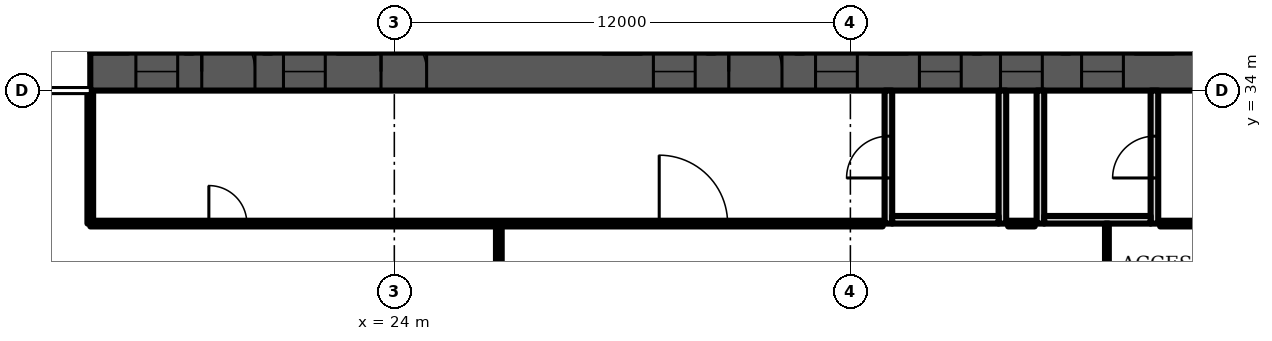
"""IFC4 building model, lengths in metres.
Left out: names, types, materials, properties, quantities, classifications, styles, units other than length and angle.
Written with IfcOpenShell. Run it as: python <this file> out.ifc"""

import sys

from ifc_helpers import new_model, si_unit, direction, frame, frame_2d, origin, place, context, subcontext, project, spatial, rectangle, extrude, element, fill, save


model = new_model("IFC4")
c1 = context("Model", 3, precision=1e-05, world=origin(), true_north=direction((0.0, 1.0)))
c2 = subcontext(c1, "Body", "Model", "MODEL_VIEW")
j1 = project(units=[si_unit("LENGTHUNIT", "METRE"), si_unit("PLANEANGLEUNIT", "RADIAN")], contexts=[c1])
p1 = place(None, origin())
s1 = spatial("IfcSite", under=j1, at=p1, CompositionType="ELEMENT")
p2 = place(p1, origin())
s2 = spatial("IfcBuilding", under=s1, at=p2, CompositionType="ELEMENT")
p3 = place(p2, frame((0.0, 0.0, 147.1)))
s3 = spatial("IfcBuildingStorey", under=s2, at=p3, CompositionType="ELEMENT", Elevation=147.1)
p4 = place(p3, frame((16.0, 34.5, 0.0), z_axis=(0.0, 0.0, 1.0), x_axis=(1.0, 0.0, 0.0)))
e1 = element("IfcWall", 1, at=p4, inside=s3, PredefinedType="SHEAR", context=c2, shape_type="SweptSolid", body=[
    extrude(rectangle(XDim=49.0, YDim=1.0, at=frame_2d((24.5, 0.0))), origin(), (0.0, 0.0, 1.0), 4.8),
])
p5 = place(p4, frame((1.2, 0.0, 0.0)))
e2 = element("IfcOpeningElement", 2, at=p5, cuts=e1, PredefinedType="OPENING", context=c2, shape_type="SweptSolid", body=[
    extrude(rectangle(XDim=1.1, YDim=2.1, at=frame_2d((0.55, 1.05))), frame((0.0, 0.51, 0.0), z_axis=(0.0, -1.0, 0.0), x_axis=(1.0, 0.0, 0.0)), (0.0, 0.0, 1.0), 1.02),
])
p6 = place(p4, frame((5.083, 0.0, 0.0)))
e3 = element("IfcOpeningElement", 3, at=p6, cuts=e1, PredefinedType="OPENING", context=c2, shape_type="SweptSolid", body=[
    extrude(rectangle(XDim=1.1, YDim=2.1, at=frame_2d((0.55, 1.05))), frame((0.0, 0.51, 0.0), z_axis=(0.0, -1.0, 0.0), x_axis=(1.0, 0.0, 0.0)), (0.0, 0.0, 1.0), 1.02),
])
p7 = place(p4, frame((2.933, 0.0, 0.0)))
e4 = element("IfcOpeningElement", 4, at=p7, cuts=e1, PredefinedType="OPENING", context=c2, shape_type="SweptSolid", body=[
    extrude(rectangle(XDim=1.4, YDim=2.1, at=frame_2d((0.7, 1.05))), frame((0.0, 0.51, 0.0), z_axis=(0.0, -1.0, 0.0), x_axis=(1.0, 0.0, 0.0)), (0.0, 0.0, 1.0), 1.02),
])
p8 = place(p4, frame((7.65, 0.0, 0.0)))
e5 = element("IfcOpeningElement", 5, at=p8, cuts=e1, PredefinedType="OPENING", context=c2, shape_type="SweptSolid", body=[
    extrude(rectangle(XDim=1.2, YDim=2.1, at=frame_2d((0.6, 1.05))), frame((0.0, 0.51, 0.0), z_axis=(0.0, -1.0, 0.0), x_axis=(1.0, 0.0, 0.0)), (0.0, 0.0, 1.0), 1.02),
])
p9 = place(p4, frame((14.817, 0.0, 0.0)))
e6 = element("IfcOpeningElement", 6, at=p9, cuts=e1, PredefinedType="OPENING", context=c2, shape_type="SweptSolid", body=[
    extrude(rectangle(XDim=1.1, YDim=2.1, at=frame_2d((0.55, 1.05))), frame((0.0, 0.51, 0.0), z_axis=(0.0, -1.0, 0.0), x_axis=(1.0, 0.0, 0.0)), (0.0, 0.0, 1.0), 1.02),
])
p10 = place(p4, frame((19.083, 0.0, 0.0)))
e7 = element("IfcOpeningElement", 7, at=p10, cuts=e1, PredefinedType="OPENING", context=c2, shape_type="SweptSolid", body=[
    extrude(rectangle(XDim=1.1, YDim=2.1, at=frame_2d((0.55, 1.05))), frame((0.0, 0.51, 0.0), z_axis=(0.0, -1.0, 0.0), x_axis=(1.0, 0.0, 0.0)), (0.0, 0.0, 1.0), 1.02),
])
p11 = place(p4, frame((16.8, 0.0, 0.0)))
e8 = element("IfcOpeningElement", 8, at=p11, cuts=e1, PredefinedType="OPENING", context=c2, shape_type="SweptSolid", body=[
    extrude(rectangle(XDim=1.4, YDim=2.1, at=frame_2d((0.7, 1.05))), frame((0.0, 0.51, 0.0), z_axis=(0.0, -1.0, 0.0), x_axis=(1.0, 0.0, 0.0)), (0.0, 0.0, 1.0), 1.02),
])
p12 = place(p4, frame((21.817, 0.0, 0.0)))
e9 = element("IfcOpeningElement", 9, at=p12, cuts=e1, PredefinedType="OPENING", context=c2, shape_type="SweptSolid", body=[
    extrude(rectangle(XDim=1.1, YDim=2.1, at=frame_2d((0.55, 1.05))), frame((0.0, 0.51, 0.0), z_axis=(0.0, -1.0, 0.0), x_axis=(1.0, 0.0, 0.0)), (0.0, 0.0, 1.0), 1.02),
])
p13 = place(p4, frame((23.95, 0.0, 0.0)))
e10 = element("IfcOpeningElement", 10, at=p13, cuts=e1, PredefinedType="OPENING", context=c2, shape_type="SweptSolid", body=[
    extrude(rectangle(XDim=1.1, YDim=2.1, at=frame_2d((0.55, 1.05))), frame((0.0, 0.51, 0.0), z_axis=(0.0, -1.0, 0.0), x_axis=(1.0, 0.0, 0.0)), (0.0, 0.0, 1.0), 1.02),
])
p14 = place(p4, frame((26.083, 0.0, 0.0)))
e11 = element("IfcOpeningElement", 11, at=p14, cuts=e1, PredefinedType="OPENING", context=c2, shape_type="SweptSolid", body=[
    extrude(rectangle(XDim=1.1, YDim=2.1, at=frame_2d((0.55, 1.05))), frame((0.0, 0.51, 0.0), z_axis=(0.0, -1.0, 0.0), x_axis=(1.0, 0.0, 0.0)), (0.0, 0.0, 1.0), 1.02),
])
p15 = place(p4, frame((33.15, 0.0, 0.0)))
e12 = element("IfcOpeningElement", 12, at=p15, cuts=e1, PredefinedType="OPENING", context=c2, shape_type="SweptSolid", body=[
    extrude(rectangle(XDim=1.2, YDim=2.1, at=frame_2d((0.6, 1.05))), frame((0.0, 0.51, 0.0), z_axis=(0.0, -1.0, 0.0), x_axis=(1.0, 0.0, 0.0)), (0.0, 0.0, 1.0), 1.02),
])
p16 = place(p4, frame((35.817, 0.0, 0.0)))
e13 = element("IfcOpeningElement", 13, at=p16, cuts=e1, PredefinedType="OPENING", context=c2, shape_type="SweptSolid", body=[
    extrude(rectangle(XDim=1.1, YDim=2.1, at=frame_2d((0.55, 1.05))), frame((0.0, 0.51, 0.0), z_axis=(0.0, -1.0, 0.0), x_axis=(1.0, 0.0, 0.0)), (0.0, 0.0, 1.0), 1.02),
])
p17 = place(p4, frame((40.083, 0.0, 0.0)))
e14 = element("IfcOpeningElement", 14, at=p17, cuts=e1, PredefinedType="OPENING", context=c2, shape_type="SweptSolid", body=[
    extrude(rectangle(XDim=1.1, YDim=2.1, at=frame_2d((0.55, 1.05))), frame((0.0, 0.51, 0.0), z_axis=(0.0, -1.0, 0.0), x_axis=(1.0, 0.0, 0.0)), (0.0, 0.0, 1.0), 1.02),
])
p18 = place(p4, frame((37.8, 0.0, 0.0)))
e15 = element("IfcOpeningElement", 15, at=p18, cuts=e1, PredefinedType="OPENING", context=c2, shape_type="SweptSolid", body=[
    extrude(rectangle(XDim=1.4, YDim=2.1, at=frame_2d((0.7, 1.05))), frame((0.0, 0.51, 0.0), z_axis=(0.0, -1.0, 0.0), x_axis=(1.0, 0.0, 0.0)), (0.0, 0.0, 1.0), 1.02),
])
p19 = place(p4, frame((42.817, 0.0, 0.0)))
e16 = element("IfcOpeningElement", 16, at=p19, cuts=e1, PredefinedType="OPENING", context=c2, shape_type="SweptSolid", body=[
    extrude(rectangle(XDim=1.1, YDim=2.1, at=frame_2d((0.55, 1.05))), frame((0.0, 0.51, 0.0), z_axis=(0.0, -1.0, 0.0), x_axis=(1.0, 0.0, 0.0)), (0.0, 0.0, 1.0), 1.02),
])
p20 = place(p4, frame((46.7, 0.0, 0.0)))
e17 = element("IfcOpeningElement", 17, at=p20, cuts=e1, PredefinedType="OPENING", context=c2, shape_type="SweptSolid", body=[
    extrude(rectangle(XDim=1.1, YDim=2.1, at=frame_2d((0.55, 1.05))), frame((0.0, 0.51, 0.0), z_axis=(0.0, -1.0, 0.0), x_axis=(1.0, 0.0, 0.0)), (0.0, 0.0, 1.0), 1.02),
])
p21 = place(p4, frame((44.667, 0.0, 0.0)))
e18 = element("IfcOpeningElement", 18, at=p21, cuts=e1, PredefinedType="OPENING", context=c2, shape_type="SweptSolid", body=[
    extrude(rectangle(XDim=1.4, YDim=2.1, at=frame_2d((0.7, 1.05))), frame((0.0, 0.51, 0.0), z_axis=(0.0, -1.0, 0.0), x_axis=(1.0, 0.0, 0.0)), (0.0, 0.0, 1.0), 1.02),
])
p22 = place(p3, frame((37.0, 30.5, 0.0), z_axis=(0.0, 0.0, 1.0), x_axis=(0.0, 1.0, 0.0)))
e19 = element("IfcWall", 19, at=p22, inside=s3, PredefinedType="PARTITIONING", context=c2, shape_type="SweptSolid", body=[
    extrude(rectangle(XDim=3.5, YDim=0.2, at=frame_2d((1.75, 0.0))), origin(), (0.0, 0.0, 1.0), 4.4),
])
p23 = place(p22, frame((1.2, 0.0, 0.0)))
e20 = element("IfcOpeningElement", 20, at=p23, cuts=e19, PredefinedType="OPENING", context=c2, shape_type="SweptSolid", body=[
    extrude(rectangle(XDim=1.1, YDim=2.1, at=frame_2d((0.55, 1.05))), frame((0.0, 0.11, 0.0), z_axis=(0.0, -1.0, 0.0), x_axis=(1.0, 0.0, 0.0)), (0.0, 0.0, 1.0), 0.22),
])
p24 = place(p3, frame((40.0, 30.5, 0.0), z_axis=(0.0, 0.0, 1.0), x_axis=(0.0, 1.0, 0.0)))
e21 = element("IfcWall", 21, at=p24, inside=s3, PredefinedType="PARTITIONING", context=c2, shape_type="SweptSolid", body=[
    extrude(rectangle(XDim=3.5, YDim=0.2, at=frame_2d((1.75, 0.0))), origin(), (0.0, 0.0, 1.0), 4.4),
])
p25 = place(p3, frame((37.1, 30.6, 0.0), z_axis=(0.0, 0.0, 1.0), x_axis=(1.0, 0.0, 0.0)))
e22 = element("IfcWall", 22, at=p25, inside=s3, PredefinedType="PARTITIONING", context=c2, shape_type="SweptSolid", body=[
    extrude(rectangle(XDim=2.8, YDim=0.2, at=frame_2d((1.4, 0.0))), origin(), (0.0, 0.0, 1.0), 4.4),
])
p26 = place(p3, frame((41.0, 30.5, 0.0), z_axis=(0.0, 0.0, 1.0), x_axis=(0.0, 1.0, 0.0)))
e23 = element("IfcWall", 23, at=p26, inside=s3, PredefinedType="PARTITIONING", context=c2, shape_type="SweptSolid", body=[
    extrude(rectangle(XDim=3.5, YDim=0.2, at=frame_2d((1.75, 0.0))), origin(), (0.0, 0.0, 1.0), 4.4),
])
p27 = place(p3, frame((44.0, 30.5, 0.0), z_axis=(0.0, 0.0, 1.0), x_axis=(0.0, 1.0, 0.0)))
e24 = element("IfcWall", 24, at=p27, inside=s3, PredefinedType="PARTITIONING", context=c2, shape_type="SweptSolid", body=[
    extrude(rectangle(XDim=3.5, YDim=0.2, at=frame_2d((1.75, 0.0))), origin(), (0.0, 0.0, 1.0), 4.4),
])
p28 = place(p27, frame((1.2, 0.0, 0.0)))
e25 = element("IfcOpeningElement", 25, at=p28, cuts=e24, PredefinedType="OPENING", context=c2, shape_type="SweptSolid", body=[
    extrude(rectangle(XDim=1.1, YDim=2.1, at=frame_2d((0.55, 1.05))), frame((0.0, 0.11, 0.0), z_axis=(0.0, -1.0, 0.0), x_axis=(1.0, 0.0, 0.0)), (0.0, 0.0, 1.0), 0.22),
])
p29 = place(p3, frame((41.1, 30.6, 0.0), z_axis=(0.0, 0.0, 1.0), x_axis=(1.0, 0.0, 0.0)))
e26 = element("IfcWall", 26, at=p29, inside=s3, PredefinedType="PARTITIONING", context=c2, shape_type="SweptSolid", body=[
    extrude(rectangle(XDim=2.8, YDim=0.2, at=frame_2d((1.4, 0.0))), origin(), (0.0, 0.0, 1.0), 4.4),
])
p30 = place(p3, frame((16.0, 30.5, 0.0), z_axis=(0.0, 0.0, 1.0), x_axis=(0.0, 1.0, 0.0)))
e27 = element("IfcWall", 27, at=p30, inside=s3, PredefinedType="PARTITIONING", context=c2, shape_type="SweptSolid", body=[
    extrude(rectangle(XDim=3.48, YDim=0.15, at=frame_2d((1.74, 0.0))), origin(), (0.0, 0.0, 1.0), 4.4),
])
p31 = place(p3, frame((16.0, 30.5, 0.0), z_axis=(0.0, 0.0, 1.0), x_axis=(1.0, 0.0, 0.0)))
e28 = element("IfcWall", 28, at=p31, inside=s3, PredefinedType="PARTITIONING", context=c2, shape_type="SweptSolid", body=[
    extrude(rectangle(XDim=20.85, YDim=0.15, at=frame_2d((10.425, 0.0))), origin(), (0.0, 0.0, 1.0), 4.4),
])
p32 = place(p31, frame((3.12, 0.0, 0.0)))
e29 = element("IfcOpeningElement", 29, at=p32, cuts=e28, PredefinedType="OPENING", context=c2, shape_type="SweptSolid", body=[
    extrude(rectangle(XDim=1.0, YDim=2.1, at=frame_2d((0.5, 1.05))), frame((0.0, 0.085, 0.0), z_axis=(0.0, -1.0, 0.0), x_axis=(1.0, 0.0, 0.0)), (0.0, 0.0, 1.0), 0.17),
])
p33 = place(p31, frame((14.97, 0.0, 0.0)))
e30 = element("IfcOpeningElement", 30, at=p33, cuts=e28, PredefinedType="OPENING", context=c2, shape_type="SweptSolid", body=[
    extrude(rectangle(XDim=1.8, YDim=2.1, at=frame_2d((0.9, 1.05))), frame((0.0, 0.085, 0.0), z_axis=(0.0, -1.0, 0.0), x_axis=(1.0, 0.0, 0.0)), (0.0, 0.0, 1.0), 0.17),
])
p34 = place(p3, frame((26.75, 15.49, 0.0), z_axis=(0.0, 0.0, 1.0), x_axis=(0.0, 1.0, 0.0)))
e31 = element("IfcWall", 31, at=p34, inside=s3, PredefinedType="PARTITIONING", context=c2, shape_type="SweptSolid", body=[
    extrude(rectangle(XDim=15.01, YDim=0.15, at=frame_2d((7.505, 0.0))), origin(), (0.0, 0.0, 1.0), 4.4),
])
p35 = place(p3, frame((42.75, 15.49, 0.0), z_axis=(0.0, 0.0, 1.0), x_axis=(0.0, 1.0, 0.0)))
e32 = element("IfcWall", 32, at=p35, inside=s3, PredefinedType="PARTITIONING", context=c2, shape_type="SweptSolid", body=[
    extrude(rectangle(XDim=15.01, YDim=0.1, at=frame_2d((7.505, 0.0))), origin(), (0.0, 0.0, 1.0), 4.4),
])
p36 = place(p3, frame((40.15, 30.5, 0.0), z_axis=(0.0, 0.0, 1.0), x_axis=(1.0, 0.0, 0.0)))
e33 = element("IfcWall", 33, at=p36, inside=s3, PredefinedType="PARTITIONING", context=c2, shape_type="SweptSolid", body=[
    extrude(rectangle(XDim=0.7, YDim=0.15, at=frame_2d((0.35, 0.0))), origin(), (0.0, 0.0, 1.0), 4.4),
])
p37 = place(p3, frame((44.15, 30.5, 0.0), z_axis=(0.0, 0.0, 1.0), x_axis=(1.0, 0.0, 0.0)))
e34 = element("IfcWall", 34, at=p37, inside=s3, PredefinedType="PARTITIONING", context=c2, shape_type="SweptSolid", body=[
    extrude(rectangle(XDim=6.04, YDim=0.15, at=frame_2d((3.02, 0.0))), origin(), (0.0, 0.0, 1.0), 4.4),
])
p38 = place(p5, origin())
e35 = element("IfcDoor", 35, at=p38, inside=s3, OperationType="DOUBLE_DOOR_SLIDING", PredefinedType="DOOR", context=c2, shape_type="SweptSolid", body=[
    extrude(rectangle(XDim=1.1, YDim=2.1, at=frame_2d((0.55, 1.05))), frame((0.0, 0.025, 0.0), z_axis=(0.0, -1.0, 0.0), x_axis=(1.0, 0.0, 0.0)), (0.0, 0.0, 1.0), 0.05),
])
fill(e2, e35)
p39 = place(p6, origin())
e36 = element("IfcDoor", 36, at=p39, inside=s3, OperationType="DOUBLE_DOOR_SLIDING", PredefinedType="DOOR", context=c2, shape_type="SweptSolid", body=[
    extrude(rectangle(XDim=1.1, YDim=2.1, at=frame_2d((0.55, 1.05))), frame((0.0, 0.025, 0.0), z_axis=(0.0, -1.0, 0.0), x_axis=(1.0, 0.0, 0.0)), (0.0, 0.0, 1.0), 0.05),
])
fill(e3, e36)
p40 = place(p7, origin())
e37 = element("IfcDoor", 37, at=p40, inside=s3, OperationType="DOUBLE_DOOR_SINGLE_SWING", PredefinedType="DOOR", context=c2, shape_type="SweptSolid", body=[
    extrude(rectangle(XDim=1.4, YDim=2.1, at=frame_2d((0.7, 1.05))), frame((0.0, 0.025, 0.0), z_axis=(0.0, -1.0, 0.0), x_axis=(1.0, 0.0, 0.0)), (0.0, 0.0, 1.0), 0.05),
])
fill(e4, e37)
p41 = place(p8, origin())
e38 = element("IfcDoor", 38, at=p41, inside=s3, OperationType="SINGLE_SWING_LEFT", PredefinedType="DOOR", context=c2, shape_type="SweptSolid", body=[
    extrude(rectangle(XDim=1.2, YDim=2.1, at=frame_2d((0.6, 1.05))), frame((0.0, 0.025, 0.0), z_axis=(0.0, -1.0, 0.0), x_axis=(1.0, 0.0, 0.0)), (0.0, 0.0, 1.0), 0.05),
])
fill(e5, e38)
p42 = place(p9, origin())
e39 = element("IfcDoor", 39, at=p42, inside=s3, OperationType="DOUBLE_DOOR_SLIDING", PredefinedType="DOOR", context=c2, shape_type="SweptSolid", body=[
    extrude(rectangle(XDim=1.1, YDim=2.1, at=frame_2d((0.55, 1.05))), frame((0.0, 0.025, 0.0), z_axis=(0.0, -1.0, 0.0), x_axis=(1.0, 0.0, 0.0)), (0.0, 0.0, 1.0), 0.05),
])
fill(e6, e39)
p43 = place(p10, origin())
e40 = element("IfcDoor", 40, at=p43, inside=s3, OperationType="DOUBLE_DOOR_SLIDING", PredefinedType="DOOR", context=c2, shape_type="SweptSolid", body=[
    extrude(rectangle(XDim=1.1, YDim=2.1, at=frame_2d((0.55, 1.05))), frame((0.0, 0.025, 0.0), z_axis=(0.0, -1.0, 0.0), x_axis=(1.0, 0.0, 0.0)), (0.0, 0.0, 1.0), 0.05),
])
fill(e7, e40)
p44 = place(p11, origin())
e41 = element("IfcDoor", 41, at=p44, inside=s3, OperationType="DOUBLE_DOOR_SINGLE_SWING", PredefinedType="DOOR", context=c2, shape_type="SweptSolid", body=[
    extrude(rectangle(XDim=1.4, YDim=2.1, at=frame_2d((0.7, 1.05))), frame((0.0, 0.025, 0.0), z_axis=(0.0, -1.0, 0.0), x_axis=(1.0, 0.0, 0.0)), (0.0, 0.0, 1.0), 0.05),
])
fill(e8, e41)
p45 = place(p12, origin())
e42 = element("IfcDoor", 42, at=p45, inside=s3, OperationType="DOUBLE_DOOR_SLIDING", PredefinedType="DOOR", context=c2, shape_type="SweptSolid", body=[
    extrude(rectangle(XDim=1.1, YDim=2.1, at=frame_2d((0.55, 1.05))), frame((0.0, 0.025, 0.0), z_axis=(0.0, -1.0, 0.0), x_axis=(1.0, 0.0, 0.0)), (0.0, 0.0, 1.0), 0.05),
])
fill(e9, e42)
p46 = place(p13, origin())
e43 = element("IfcDoor", 43, at=p46, inside=s3, OperationType="DOUBLE_DOOR_SLIDING", PredefinedType="DOOR", context=c2, shape_type="SweptSolid", body=[
    extrude(rectangle(XDim=1.1, YDim=2.1, at=frame_2d((0.55, 1.05))), frame((0.0, 0.025, 0.0), z_axis=(0.0, -1.0, 0.0), x_axis=(1.0, 0.0, 0.0)), (0.0, 0.0, 1.0), 0.05),
])
fill(e10, e43)
p47 = place(p14, origin())
e44 = element("IfcDoor", 44, at=p47, inside=s3, OperationType="DOUBLE_DOOR_SLIDING", PredefinedType="DOOR", context=c2, shape_type="SweptSolid", body=[
    extrude(rectangle(XDim=1.1, YDim=2.1, at=frame_2d((0.55, 1.05))), frame((0.0, 0.025, 0.0), z_axis=(0.0, -1.0, 0.0), x_axis=(1.0, 0.0, 0.0)), (0.0, 0.0, 1.0), 0.05),
])
fill(e11, e44)
p48 = place(p23, origin())
e45 = element("IfcDoor", 45, at=p48, inside=s3, OperationType="SINGLE_SWING_LEFT", PredefinedType="DOOR", context=c2, shape_type="SweptSolid", body=[
    extrude(rectangle(XDim=1.1, YDim=2.1, at=frame_2d((0.55, 1.05))), frame((0.0, 0.025, 0.0), z_axis=(0.0, -1.0, 0.0), x_axis=(1.0, 0.0, 0.0)), (0.0, 0.0, 1.0), 0.05),
])
fill(e20, e45)
p49 = place(p28, origin())
e46 = element("IfcDoor", 46, at=p49, inside=s3, OperationType="SINGLE_SWING_LEFT", PredefinedType="DOOR", context=c2, shape_type="SweptSolid", body=[
    extrude(rectangle(XDim=1.1, YDim=2.1, at=frame_2d((0.55, 1.05))), frame((0.0, 0.025, 0.0), z_axis=(0.0, -1.0, 0.0), x_axis=(1.0, 0.0, 0.0)), (0.0, 0.0, 1.0), 0.05),
])
fill(e25, e46)
p50 = place(p32, origin())
e47 = element("IfcDoor", 47, at=p50, inside=s3, OperationType="SINGLE_SWING_LEFT", PredefinedType="DOOR", context=c2, shape_type="SweptSolid", body=[
    extrude(rectangle(XDim=1.0, YDim=2.1, at=frame_2d((0.5, 1.05))), frame((0.0, 0.025, 0.0), z_axis=(0.0, -1.0, 0.0), x_axis=(1.0, 0.0, 0.0)), (0.0, 0.0, 1.0), 0.05),
])
fill(e29, e47)
p51 = place(p33, origin())
e48 = element("IfcDoor", 48, at=p51, inside=s3, OperationType="DOUBLE_DOOR_SINGLE_SWING", PredefinedType="DOOR", context=c2, shape_type="SweptSolid", body=[
    extrude(rectangle(XDim=1.8, YDim=2.1, at=frame_2d((0.9, 1.05))), frame((0.0, 0.025, 0.0), z_axis=(0.0, -1.0, 0.0), x_axis=(1.0, 0.0, 0.0)), (0.0, 0.0, 1.0), 0.05),
])
fill(e30, e48)
save(model, sys.argv[1])
